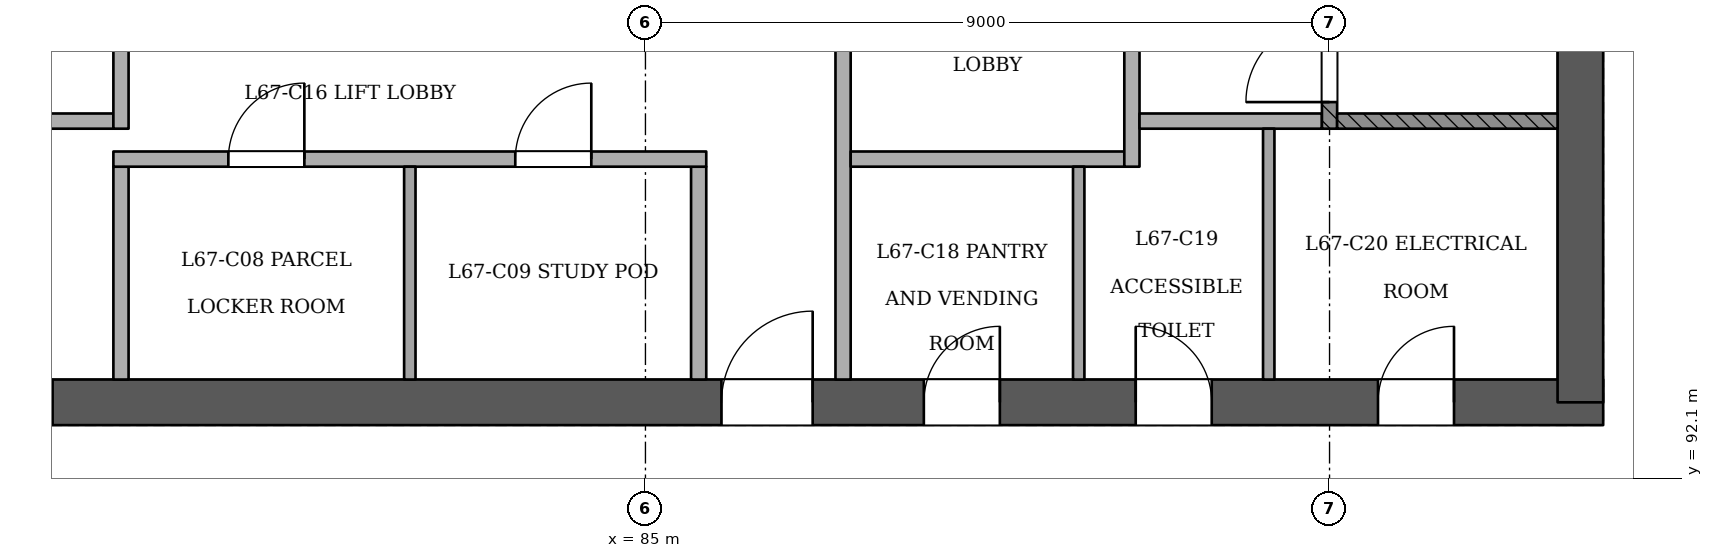
"""IFC4 building model, lengths in metres.
Left out: names, types, materials, properties, quantities, classifications, styles, units other than length and angle.
Written with IfcOpenShell. Run it as: python <this file> out.ifc"""

import sys

from ifc_helpers import new_model, si_unit, direction, frame, frame_2d, origin, place, context, subcontext, project, spatial, rectangle, extrude, element, fill, save


model = new_model("IFC4")
c1 = context("Model", 3, precision=1e-05, world=origin(), true_north=direction((0.0, 1.0)))
c2 = subcontext(c1, "Body", "Model", "MODEL_VIEW")
j1 = project(units=[si_unit("LENGTHUNIT", "METRE"), si_unit("PLANEANGLEUNIT", "RADIAN")], contexts=[c1])
p1 = place(None, origin())
s1 = spatial("IfcSite", under=j1, at=p1, CompositionType="ELEMENT")
p2 = place(p1, origin())
s2 = spatial("IfcBuilding", under=s1, at=p2, CompositionType="ELEMENT")
p3 = place(p2, frame((0.0, 0.0, 260.8)))
s3 = spatial("IfcBuildingStorey", under=s2, at=p3, CompositionType="ELEMENT", Elevation=260.8)
p4 = place(p3, frame((72.7, 93.1, 0.0), z_axis=(0.0, 0.0, 1.0), x_axis=(1.0, 0.0, 0.0)))
e1 = element("IfcWall", 1, at=p4, inside=s3, PredefinedType="SHEAR", context=c2, shape_type="SweptSolid", body=[
    extrude(rectangle(XDim=24.9, YDim=0.6, at=frame_2d((12.45, 0.0))), origin(), (0.0, 0.0, 1.0), 3.6),
])
p5 = place(p4, frame((1.1, 0.0, 0.0)))
e2 = element("IfcOpeningElement", 2, at=p5, cuts=e1, PredefinedType="OPENING", context=c2, shape_type="SweptSolid", body=[
    extrude(rectangle(XDim=1.2, YDim=2.1, at=frame_2d((0.6, 1.05))), frame((0.0, 0.311, 0.0), z_axis=(0.0, -1.0, 0.0), x_axis=(1.0, 0.0, 0.0)), (0.0, 0.0, 1.0), 0.621),
])
p6 = place(p4, frame((3.3, 0.0, 0.0)))
e3 = element("IfcOpeningElement", 3, at=p6, cuts=e1, PredefinedType="OPENING", context=c2, shape_type="SweptSolid", body=[
    extrude(rectangle(XDim=1.2, YDim=2.1, at=frame_2d((0.6, 1.05))), frame((0.0, 0.311, 0.0), z_axis=(0.0, -1.0, 0.0), x_axis=(1.0, 0.0, 0.0)), (0.0, 0.0, 1.0), 0.621),
])
p7 = place(p4, frame((13.3, 0.0, 0.0)))
e4 = element("IfcOpeningElement", 4, at=p7, cuts=e1, PredefinedType="OPENING", context=c2, shape_type="SweptSolid", body=[
    extrude(rectangle(XDim=1.2, YDim=2.1, at=frame_2d((0.6, 1.05))), frame((0.0, 0.311, 0.0), z_axis=(0.0, -1.0, 0.0), x_axis=(1.0, 0.0, 0.0)), (0.0, 0.0, 1.0), 0.621),
])
p8 = place(p4, frame((15.962, 0.0, 0.0)))
e5 = element("IfcOpeningElement", 5, at=p8, cuts=e1, PredefinedType="OPENING", context=c2, shape_type="SweptSolid", body=[
    extrude(rectangle(XDim=1.0, YDim=2.1, at=frame_2d((0.5, 1.05))), frame((0.0, 0.311, 0.0), z_axis=(0.0, -1.0, 0.0), x_axis=(1.0, 0.0, 0.0)), (0.0, 0.0, 1.0), 0.621),
])
p9 = place(p4, frame((18.75, 0.0, 0.0)))
e6 = element("IfcOpeningElement", 6, at=p9, cuts=e1, PredefinedType="OPENING", context=c2, shape_type="SweptSolid", body=[
    extrude(rectangle(XDim=1.0, YDim=2.1, at=frame_2d((0.5, 1.05))), frame((0.0, 0.311, 0.0), z_axis=(0.0, -1.0, 0.0), x_axis=(1.0, 0.0, 0.0)), (0.0, 0.0, 1.0), 0.621),
])
p10 = place(p4, frame((21.938, 0.0, 0.0)))
e7 = element("IfcOpeningElement", 7, at=p10, cuts=e1, PredefinedType="OPENING", context=c2, shape_type="SweptSolid", body=[
    extrude(rectangle(XDim=1.0, YDim=2.1, at=frame_2d((0.5, 1.05))), frame((0.0, 0.311, 0.0), z_axis=(0.0, -1.0, 0.0), x_axis=(1.0, 0.0, 0.0)), (0.0, 0.0, 1.0), 0.621),
])
p11 = place(p3, frame((97.3, 93.1, 0.0), z_axis=(0.0, 0.0, 1.0), x_axis=(0.0, 1.0, 0.0)))
e8 = element("IfcWall", 8, at=p11, inside=s3, PredefinedType="SHEAR", context=c2, shape_type="SweptSolid", body=[
    extrude(rectangle(XDim=10.9, YDim=0.6, at=frame_2d((5.45, 0.0))), origin(), (0.0, 0.0, 1.0), 3.6),
])
p12 = place(p3, frame((78.1, 93.4, 0.0), z_axis=(0.0, 0.0, 1.0), x_axis=(0.0, 1.0, 0.0)))
e9 = element("IfcWall", 9, at=p12, inside=s3, PredefinedType="PARTITIONING", context=c2, shape_type="SweptSolid", body=[
    extrude(rectangle(XDim=2.8, YDim=0.2, at=frame_2d((1.4, 0.0))), origin(), (0.0, 0.0, 1.0), 3.2),
])
p13 = place(p3, frame((81.9, 93.4, 0.0), z_axis=(0.0, 0.0, 1.0), x_axis=(0.0, 1.0, 0.0)))
e10 = element("IfcWall", 10, at=p13, inside=s3, PredefinedType="PARTITIONING", context=c2, shape_type="SweptSolid", body=[
    extrude(rectangle(XDim=2.8, YDim=0.15, at=frame_2d((1.4, 0.0))), origin(), (0.0, 0.0, 1.0), 3.2),
])
p14 = place(p3, frame((85.7, 93.4, 0.0), z_axis=(0.0, 0.0, 1.0), x_axis=(0.0, 1.0, 0.0)))
e11 = element("IfcWall", 11, at=p14, inside=s3, PredefinedType="PARTITIONING", context=c2, shape_type="SweptSolid", body=[
    extrude(rectangle(XDim=2.8, YDim=0.2, at=frame_2d((1.4, 0.0))), origin(), (0.0, 0.0, 1.0), 3.2),
])
p15 = place(p3, frame((87.6, 93.4, 0.0), z_axis=(0.0, 0.0, 1.0), x_axis=(0.0, 1.0, 0.0)))
e12 = element("IfcWall", 12, at=p15, inside=s3, PredefinedType="PARTITIONING", context=c2, shape_type="SweptSolid", body=[
    extrude(rectangle(XDim=7.0, YDim=0.2, at=frame_2d((3.5, 0.0))), origin(), (0.0, 0.0, 1.0), 3.2),
])
p16 = place(p15, frame((4.45, 0.0, 0.0)))
e13 = element("IfcOpeningElement", 13, at=p16, cuts=e12, PredefinedType="OPENING", context=c2, shape_type="SweptSolid", body=[
    extrude(rectangle(XDim=1.1, YDim=2.1, at=frame_2d((0.55, 1.05))), frame((0.0, 0.11, 0.0), z_axis=(0.0, -1.0, 0.0), x_axis=(1.0, 0.0, 0.0)), (0.0, 0.0, 1.0), 0.221),
])
p17 = place(p3, frame((90.7, 93.4, 0.0), z_axis=(0.0, 0.0, 1.0), x_axis=(0.0, 1.0, 0.0)))
e14 = element("IfcWall", 14, at=p17, inside=s3, PredefinedType="PARTITIONING", context=c2, shape_type="SweptSolid", body=[
    extrude(rectangle(XDim=2.8, YDim=0.15, at=frame_2d((1.4, 0.0))), origin(), (0.0, 0.0, 1.0), 3.2),
])
p18 = place(p3, frame((93.2, 93.4, 0.0), z_axis=(0.0, 0.0, 1.0), x_axis=(0.0, 1.0, 0.0)))
e15 = element("IfcWall", 15, at=p18, inside=s3, PredefinedType="PARTITIONING", context=c2, shape_type="SweptSolid", body=[
    extrude(rectangle(XDim=3.3, YDim=0.15, at=frame_2d((1.65, 0.0))), origin(), (0.0, 0.0, 1.0), 3.2),
])
p19 = place(p3, frame((78.0, 96.3, 0.0), z_axis=(0.0, 0.0, 1.0), x_axis=(1.0, 0.0, 0.0)))
e16 = element("IfcWall", 16, at=p19, inside=s3, PredefinedType="PARTITIONING", context=c2, shape_type="SweptSolid", body=[
    extrude(rectangle(XDim=7.8, YDim=0.2, at=frame_2d((3.9, 0.0))), origin(), (0.0, 0.0, 1.0), 3.2),
])
p20 = place(p19, frame((1.512, 0.0, 0.0)))
e17 = element("IfcOpeningElement", 17, at=p20, cuts=e16, PredefinedType="OPENING", context=c2, shape_type="SweptSolid", body=[
    extrude(rectangle(XDim=1.0, YDim=2.1, at=frame_2d((0.5, 1.05))), frame((0.0, 0.11, 0.0), z_axis=(0.0, -1.0, 0.0), x_axis=(1.0, 0.0, 0.0)), (0.0, 0.0, 1.0), 0.221),
])
p21 = place(p19, frame((5.288, 0.0, 0.0)))
e18 = element("IfcOpeningElement", 18, at=p21, cuts=e16, PredefinedType="OPENING", context=c2, shape_type="SweptSolid", body=[
    extrude(rectangle(XDim=1.0, YDim=2.1, at=frame_2d((0.5, 1.05))), frame((0.0, 0.11, 0.0), z_axis=(0.0, -1.0, 0.0), x_axis=(1.0, 0.0, 0.0)), (0.0, 0.0, 1.0), 0.221),
])
p22 = place(p3, frame((87.7, 96.3, 0.0), z_axis=(0.0, 0.0, 1.0), x_axis=(1.0, 0.0, 0.0)))
e19 = element("IfcWall", 19, at=p22, inside=s3, PredefinedType="PARTITIONING", context=c2, shape_type="SweptSolid", body=[
    extrude(rectangle(XDim=3.6, YDim=0.2, at=frame_2d((1.8, 0.0))), origin(), (0.0, 0.0, 1.0), 3.2),
])
p23 = place(p3, frame((91.4, 96.2, 0.0), z_axis=(0.0, 0.0, 1.0), x_axis=(0.0, 1.0, 0.0)))
e20 = element("IfcWall", 20, at=p23, inside=s3, PredefinedType="PARTITIONING", context=c2, shape_type="SweptSolid", body=[
    extrude(rectangle(XDim=4.2, YDim=0.2, at=frame_2d((2.1, 0.0))), origin(), (0.0, 0.0, 1.0), 3.2),
])
p24 = place(p23, frame((2.45, 0.0, 0.0)))
e21 = element("IfcOpeningElement", 21, at=p24, cuts=e20, PredefinedType="OPENING", context=c2, shape_type="SweptSolid", body=[
    extrude(rectangle(XDim=1.1, YDim=2.1, at=frame_2d((0.55, 1.05))), frame((0.0, 0.11, 0.0), z_axis=(0.0, -1.0, 0.0), x_axis=(1.0, 0.0, 0.0)), (0.0, 0.0, 1.0), 0.221),
])
p25 = place(p3, frame((76.1, 96.8, 0.0), z_axis=(0.0, 0.0, 1.0), x_axis=(1.0, 0.0, 0.0)))
e22 = element("IfcWall", 22, at=p25, inside=s3, PredefinedType="PARTITIONING", context=c2, shape_type="SweptSolid", body=[
    extrude(rectangle(XDim=1.9, YDim=0.2, at=frame_2d((0.95, 0.0))), origin(), (0.0, 0.0, 1.0), 3.2),
])
p26 = place(p3, frame((78.1, 96.7, 0.0), z_axis=(0.0, 0.0, 1.0), x_axis=(0.0, 1.0, 0.0)))
e23 = element("IfcWall", 23, at=p26, inside=s3, PredefinedType="PARTITIONING", context=c2, shape_type="SweptSolid", body=[
    extrude(rectangle(XDim=3.7, YDim=0.2, at=frame_2d((1.85, 0.0))), origin(), (0.0, 0.0, 1.0), 3.2),
])
p27 = place(p26, frame((1.95, 0.0, 0.0)))
e24 = element("IfcOpeningElement", 24, at=p27, cuts=e23, PredefinedType="OPENING", context=c2, shape_type="SweptSolid", body=[
    extrude(rectangle(XDim=1.1, YDim=2.1, at=frame_2d((0.55, 1.05))), frame((0.0, 0.11, 0.0), z_axis=(0.0, -1.0, 0.0), x_axis=(1.0, 0.0, 0.0)), (0.0, 0.0, 1.0), 0.221),
])
p28 = place(p3, frame((91.5, 96.8, 0.0), z_axis=(0.0, 0.0, 1.0), x_axis=(1.0, 0.0, 0.0)))
e25 = element("IfcWall", 25, at=p28, inside=s3, PredefinedType="PARTITIONING", context=c2, shape_type="SweptSolid", body=[
    extrude(rectangle(XDim=2.4, YDim=0.2, at=frame_2d((1.2, 0.0))), origin(), (0.0, 0.0, 1.0), 3.2),
])
p29 = place(p3, frame((94.0, 96.7, 0.0), z_axis=(0.0, 0.0, 1.0), x_axis=(0.0, 1.0, 0.0)))
e26 = element("IfcWall", 26, at=p29, inside=s3, PredefinedType="SOLIDWALL", context=c2, shape_type="SweptSolid", body=[
    extrude(rectangle(XDim=3.7, YDim=0.2, at=frame_2d((1.85, 0.0))), origin(), (0.0, 0.0, 1.0), 3.2),
])
p30 = place(p29, frame((0.35, 0.0, 0.0)))
e27 = element("IfcOpeningElement", 27, at=p30, cuts=e26, PredefinedType="OPENING", context=c2, shape_type="SweptSolid", body=[
    extrude(rectangle(XDim=1.1, YDim=2.1, at=frame_2d((0.55, 1.05))), frame((0.0, 0.11, 0.0), z_axis=(0.0, -1.0, 0.0), x_axis=(1.0, 0.0, 0.0)), (0.0, 0.0, 1.0), 0.221),
])
p31 = place(p3, frame((94.1, 96.8, 0.0), z_axis=(0.0, 0.0, 1.0), x_axis=(1.0, 0.0, 0.0)))
e28 = element("IfcWall", 28, at=p31, inside=s3, PredefinedType="SOLIDWALL", context=c2, shape_type="SweptSolid", body=[
    extrude(rectangle(XDim=2.9, YDim=0.2, at=frame_2d((1.45, 0.0))), origin(), (0.0, 0.0, 1.0), 3.2),
])
p32 = place(p30, origin())
e29 = element("IfcDoor", 29, at=p32, inside=s3, OperationType="SINGLE_SWING_LEFT", PredefinedType="NOTDEFINED", context=c2, shape_type="SweptSolid", body=[
    extrude(rectangle(XDim=1.1, YDim=2.1, at=frame_2d((0.55, 1.05))), frame((0.0, 0.025, 0.0), z_axis=(0.0, -1.0, 0.0), x_axis=(1.0, 0.0, 0.0)), (0.0, 0.0, 1.0), 0.05),
])
fill(e27, e29)
p33 = place(p6, origin())
e30 = element("IfcDoor", 30, at=p33, inside=s3, OperationType="SINGLE_SWING_LEFT", PredefinedType="NOTDEFINED", context=c2, shape_type="SweptSolid", body=[
    extrude(rectangle(XDim=1.2, YDim=2.1, at=frame_2d((0.6, 1.05))), frame((0.0, 0.025, 0.0), z_axis=(0.0, -1.0, 0.0), x_axis=(1.0, 0.0, 0.0)), (0.0, 0.0, 1.0), 0.05),
])
fill(e3, e30)
p34 = place(p7, origin())
e31 = element("IfcDoor", 31, at=p34, inside=s3, OperationType="SINGLE_SWING_RIGHT", PredefinedType="NOTDEFINED", context=c2, shape_type="SweptSolid", body=[
    extrude(rectangle(XDim=1.2, YDim=2.1, at=frame_2d((0.6, 1.05))), frame((0.0, 0.025, 0.0), z_axis=(0.0, -1.0, 0.0), x_axis=(1.0, 0.0, 0.0)), (0.0, 0.0, 1.0), 0.05),
])
fill(e4, e31)
p35 = place(p8, origin())
e32 = element("IfcDoor", 32, at=p35, inside=s3, OperationType="SINGLE_SWING_RIGHT", PredefinedType="NOTDEFINED", context=c2, shape_type="SweptSolid", body=[
    extrude(rectangle(XDim=1.0, YDim=2.1, at=frame_2d((0.5, 1.05))), frame((0.0, 0.025, 0.0), z_axis=(0.0, -1.0, 0.0), x_axis=(1.0, 0.0, 0.0)), (0.0, 0.0, 1.0), 0.05),
])
fill(e5, e32)
p36 = place(p9, origin())
e33 = element("IfcDoor", 33, at=p36, inside=s3, OperationType="SINGLE_SWING_LEFT", PredefinedType="NOTDEFINED", context=c2, shape_type="SweptSolid", body=[
    extrude(rectangle(XDim=1.0, YDim=2.1, at=frame_2d((0.5, 1.05))), frame((0.0, 0.025, 0.0), z_axis=(0.0, -1.0, 0.0), x_axis=(1.0, 0.0, 0.0)), (0.0, 0.0, 1.0), 0.05),
])
fill(e6, e33)
p37 = place(p10, origin())
e34 = element("IfcDoor", 34, at=p37, inside=s3, OperationType="SINGLE_SWING_RIGHT", PredefinedType="NOTDEFINED", context=c2, shape_type="SweptSolid", body=[
    extrude(rectangle(XDim=1.0, YDim=2.1, at=frame_2d((0.5, 1.05))), frame((0.0, 0.025, 0.0), z_axis=(0.0, -1.0, 0.0), x_axis=(1.0, 0.0, 0.0)), (0.0, 0.0, 1.0), 0.05),
])
fill(e7, e34)
p38 = place(p20, origin())
e35 = element("IfcDoor", 35, at=p38, inside=s3, OperationType="SINGLE_SWING_RIGHT", PredefinedType="NOTDEFINED", context=c2, shape_type="SweptSolid", body=[
    extrude(rectangle(XDim=1.0, YDim=2.1, at=frame_2d((0.5, 1.05))), frame((0.0, 0.025, 0.0), z_axis=(0.0, -1.0, 0.0), x_axis=(1.0, 0.0, 0.0)), (0.0, 0.0, 1.0), 0.05),
])
fill(e17, e35)
p39 = place(p21, origin())
e36 = element("IfcDoor", 36, at=p39, inside=s3, OperationType="SINGLE_SWING_RIGHT", PredefinedType="NOTDEFINED", context=c2, shape_type="SweptSolid", body=[
    extrude(rectangle(XDim=1.0, YDim=2.1, at=frame_2d((0.5, 1.05))), frame((0.0, 0.025, 0.0), z_axis=(0.0, -1.0, 0.0), x_axis=(1.0, 0.0, 0.0)), (0.0, 0.0, 1.0), 0.05),
])
fill(e18, e36)
save(model, sys.argv[1])
